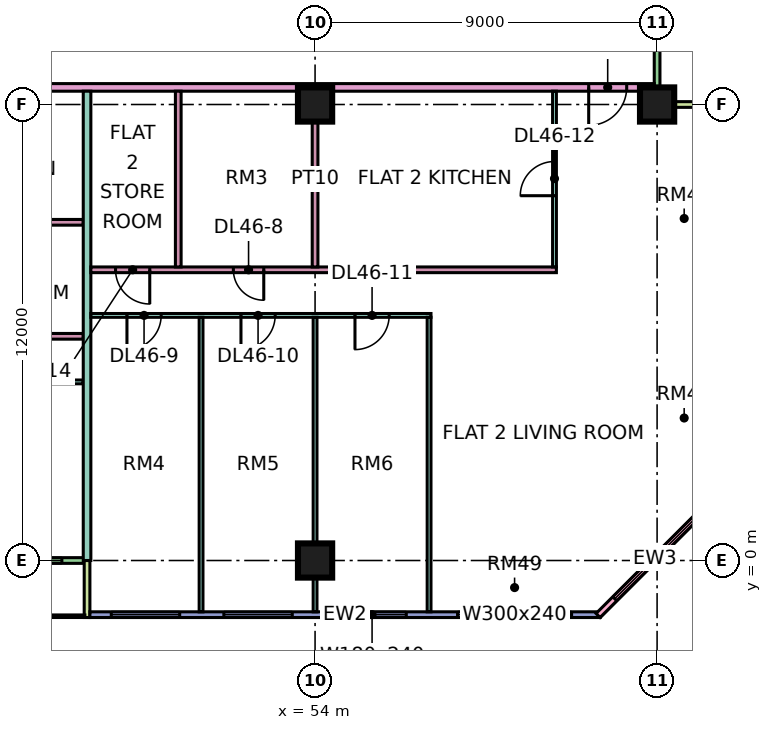
"""IFC4 building model, lengths in metres.
Left out: names, types, materials, properties, quantities, classifications, styles, units other than length and angle.
Written with IfcOpenShell. Run it as: python <this file> out.ifc"""

import sys

from ifc_helpers import new_model, si_unit, direction, frame, frame_2d, origin, origin_2d, place, context, subcontext, project, spatial, rectangle, extrude, element, fill, save


model = new_model("IFC4")
c1 = context("Model", 3, precision=1e-05, world=origin(), true_north=direction((0.0, 1.0)))
c2 = subcontext(c1, "Body", "Model", "MODEL_VIEW")
j1 = project(units=[si_unit("LENGTHUNIT", "METRE"), si_unit("PLANEANGLEUNIT", "RADIAN")], contexts=[c1])
p1 = place(None, origin())
s1 = spatial("IfcSite", under=j1, at=p1, CompositionType="ELEMENT")
p2 = place(p1, origin())
s2 = spatial("IfcBuilding", under=s1, at=p2, CompositionType="ELEMENT")
p3 = place(p2, frame((0.0, 0.0, 198.65)))
s3 = spatial("IfcBuildingStorey", under=s2, at=p3, CompositionType="ELEMENT", Elevation=198.65)
for number, where, z_axis, x_axis in (
    (1, (54.0, 0.0, 0.0), (0.0, 0.0, 1.0), (1.0, 0.0, 0.0)),
    (2, (54.0, 12.0, 0.0), (0.0, 0.0, 1.0), (1.0, 0.0, 0.0)),
    (3, (63.0, 12.0, 0.0), (0.0, 0.0, 1.0), (1.0, 0.0, 0.0)),
):
    element("IfcColumn", number, at=place(p3, frame(where, z_axis=z_axis, x_axis=x_axis)), inside=s3, PredefinedType="COLUMN", context=c2, shape_type="SweptSolid", body=[
        extrude(rectangle(XDim=0.9, YDim=0.9, at=origin_2d()), origin(), (0.0, 0.0, 1.0), 3.75),
    ])
p4 = place(p3, frame((36.075, 0.0, 0.0), z_axis=(0.0, 0.0, 1.0), x_axis=(1.0, 0.0, 0.0)))
e4 = element("IfcWall", 4, at=p4, inside=s3, PredefinedType="SOLIDWALL", context=c2, shape_type="SweptSolid", body=[
    extrude(rectangle(XDim=11.85, YDim=0.15, at=frame_2d((5.925, 0.0))), origin(), (0.0, 0.0, 1.0), 3.35),
])
p5 = place(p4, frame((1.1, 0.0, 0.0)))
e5 = element("IfcOpeningElement", 5, at=p5, cuts=e4, PredefinedType="OPENING", context=c2, shape_type="SweptSolid", body=[
    extrude(rectangle(XDim=1.2, YDim=2.4, at=frame_2d((0.6, 1.2))), frame((0.0, 0.085, 0.0), z_axis=(0.0, -1.0, 0.0), x_axis=(1.0, 0.0, 0.0)), (0.0, 0.0, 1.0), 0.17),
])
p6 = place(p4, frame((4.15, 0.0, 0.45)))
e6 = element("IfcOpeningElement", 6, at=p6, cuts=e4, PredefinedType="OPENING", context=c2, shape_type="SweptSolid", body=[
    extrude(rectangle(XDim=3.0, YDim=2.4, at=frame_2d((1.5, 1.2))), frame((0.0, 0.085, 0.0), z_axis=(0.0, -1.0, 0.0), x_axis=(1.0, 0.0, 0.0)), (0.0, 0.0, 1.0), 0.17),
])
p7 = place(p4, frame((10.062, 0.0, 0.45)))
e7 = element("IfcOpeningElement", 7, at=p7, cuts=e4, PredefinedType="OPENING", context=c2, shape_type="SweptSolid", body=[
    extrude(rectangle(XDim=1.2, YDim=2.4, at=frame_2d((0.6, 1.2))), frame((0.0, 0.085, 0.0), z_axis=(0.0, -1.0, 0.0), x_axis=(1.0, 0.0, 0.0)), (0.0, 0.0, 1.0), 0.17),
])
p8 = place(p3, frame((48.0, -1.5, 0.0), z_axis=(0.0, 0.0, 1.0), x_axis=(0.0, 1.0, 0.0)))
e8 = element("IfcWall", 8, at=p8, inside=s3, PredefinedType="SOLIDWALL", context=c2, shape_type="SweptSolid", body=[
    extrude(rectangle(XDim=1.5, YDim=0.15, at=frame_2d((0.75, 0.0))), origin(), (0.0, 0.0, 1.0), 3.35),
])
p9 = place(p3, frame((48.075, -1.425, 0.0), z_axis=(0.0, 0.0, 1.0), x_axis=(1.0, 0.0, 0.0)))
e9 = element("IfcWall", 9, at=p9, inside=s3, PredefinedType="SOLIDWALL", context=c2, shape_type="SweptSolid", body=[
    extrude(rectangle(XDim=13.425, YDim=0.15, at=frame_2d((6.712, 0.0))), origin(), (0.0, 0.0, 1.0), 3.35),
])
p10 = place(p9, frame((0.562, 0.0, 0.45)))
e10 = element("IfcOpeningElement", 10, at=p10, cuts=e9, PredefinedType="OPENING", context=c2, shape_type="SweptSolid", body=[
    extrude(rectangle(XDim=1.8, YDim=2.4, at=frame_2d((0.9, 1.2))), frame((0.0, 0.085, 0.0), z_axis=(0.0, -1.0, 0.0), x_axis=(1.0, 0.0, 0.0)), (0.0, 0.0, 1.0), 0.17),
])
p11 = place(p9, frame((3.525, 0.0, 0.45)))
e11 = element("IfcOpeningElement", 11, at=p11, cuts=e9, PredefinedType="OPENING", context=c2, shape_type="SweptSolid", body=[
    extrude(rectangle(XDim=1.8, YDim=2.4, at=frame_2d((0.9, 1.2))), frame((0.0, 0.085, 0.0), z_axis=(0.0, -1.0, 0.0), x_axis=(1.0, 0.0, 0.0)), (0.0, 0.0, 1.0), 0.17),
])
p12 = place(p9, frame((6.525, 0.0, 0.45)))
e12 = element("IfcOpeningElement", 12, at=p12, cuts=e9, PredefinedType="OPENING", context=c2, shape_type="SweptSolid", body=[
    extrude(rectangle(XDim=1.8, YDim=2.4, at=frame_2d((0.9, 1.2))), frame((0.0, 0.085, 0.0), z_axis=(0.0, -1.0, 0.0), x_axis=(1.0, 0.0, 0.0)), (0.0, 0.0, 1.0), 0.17),
])
p13 = place(p9, frame((9.675, 0.0, 0.45)))
e13 = element("IfcOpeningElement", 13, at=p13, cuts=e9, PredefinedType="OPENING", context=c2, shape_type="SweptSolid", body=[
    extrude(rectangle(XDim=3.0, YDim=2.4, at=frame_2d((1.5, 1.2))), frame((0.0, 0.085, 0.0), z_axis=(0.0, -1.0, 0.0), x_axis=(1.0, 0.0, 0.0)), (0.0, 0.0, 1.0), 0.17),
])
p14 = place(p3, frame((61.447, -1.447, 0.0), z_axis=(0.0, 0.0, 1.0), x_axis=(0.707106781187, 0.707106781187, 0.0)))
e14 = element("IfcWall", 14, at=p14, inside=s3, PredefinedType="SOLIDWALL", context=c2, shape_type="SweptSolid", body=[
    extrude(rectangle(XDim=4.243, YDim=0.15, at=frame_2d((2.121, 0.0))), origin(), (0.0, 0.0, 1.0), 3.35),
])
p15 = place(p14, frame((0.621, 0.0, 0.45)))
e15 = element("IfcOpeningElement", 15, at=p15, cuts=e14, PredefinedType="OPENING", context=c2, shape_type="SweptSolid", body=[
    extrude(rectangle(XDim=3.0, YDim=2.4, at=frame_2d((1.5, 1.2))), frame((0.0, 0.085, 0.0), z_axis=(0.0, -1.0, 0.0), x_axis=(1.0, 0.0, 0.0)), (0.0, 0.0, 1.0), 0.17),
])
p16 = place(p3, frame((63.0, 12.075, 0.0), z_axis=(0.0, 0.0, 1.0), x_axis=(0.0, 1.0, 0.0)))
e16 = element("IfcWall", 16, at=p16, inside=s3, PredefinedType="SOLIDWALL", context=c2, shape_type="SweptSolid", body=[
    extrude(rectangle(XDim=10.35, YDim=0.15, at=frame_2d((5.175, 0.0))), origin(), (0.0, 0.0, 1.0), 3.35),
])
p17 = place(p16, frame((4.125, 0.0, 0.45)))
e17 = element("IfcOpeningElement", 17, at=p17, cuts=e16, PredefinedType="OPENING", context=c2, shape_type="SweptSolid", body=[
    extrude(rectangle(XDim=1.8, YDim=2.4, at=frame_2d((0.9, 1.2))), frame((0.0, 0.085, 0.0), z_axis=(0.0, -1.0, 0.0), x_axis=(1.0, 0.0, 0.0)), (0.0, 0.0, 1.0), 0.17),
])
p18 = place(p16, frame((8.137, 0.0, 0.45)))
e18 = element("IfcOpeningElement", 18, at=p18, cuts=e16, PredefinedType="OPENING", context=c2, shape_type="SweptSolid", body=[
    extrude(rectangle(XDim=1.8, YDim=2.4, at=frame_2d((0.9, 1.2))), frame((0.0, 0.085, 0.0), z_axis=(0.0, -1.0, 0.0), x_axis=(1.0, 0.0, 0.0)), (0.0, 0.0, 1.0), 0.17),
])
p19 = place(p3, frame((64.5, 12.0, 0.0), z_axis=(0.0, 0.0, 1.0), x_axis=(-1.0, 0.0, 0.0)))
e19 = element("IfcWall", 19, at=p19, inside=s3, PredefinedType="SOLIDWALL", context=c2, shape_type="SweptSolid", body=[
    extrude(rectangle(XDim=1.5, YDim=0.15, at=frame_2d((0.75, 0.0))), origin(), (0.0, 0.0, 1.0), 3.35),
])
p20 = place(p3, frame((33.05, 4.7, 0.0), z_axis=(0.0, 0.0, 1.0), x_axis=(1.0, 0.0, 0.0)))
e20 = element("IfcWall", 20, at=p20, inside=s3, PredefinedType="PARTITIONING", context=c2, shape_type="SweptSolid", body=[
    extrude(rectangle(XDim=14.85, YDim=0.1, at=frame_2d((7.425, 0.0))), origin(), (0.0, 0.0, 1.0), 3.35),
])
p21 = place(p20, frame((1.0, 0.0, 0.0)))
e21 = element("IfcOpeningElement", 21, at=p21, cuts=e20, PredefinedType="OPENING", context=c2, shape_type="SweptSolid", body=[
    extrude(rectangle(XDim=0.9, YDim=2.1, at=frame_2d((0.45, 1.05))), frame((0.0, 0.06, 0.0), z_axis=(0.0, -1.0, 0.0), x_axis=(1.0, 0.0, 0.0)), (0.0, 0.0, 1.0), 0.12),
])
p22 = place(p20, frame((4.0, 0.0, 0.0)))
e22 = element("IfcOpeningElement", 22, at=p22, cuts=e20, PredefinedType="OPENING", context=c2, shape_type="SweptSolid", body=[
    extrude(rectangle(XDim=0.9, YDim=2.1, at=frame_2d((0.45, 1.05))), frame((0.0, 0.06, 0.0), z_axis=(0.0, -1.0, 0.0), x_axis=(1.0, 0.0, 0.0)), (0.0, 0.0, 1.0), 0.12),
])
p23 = place(p20, frame((10.0, 0.0, 0.0)))
e23 = element("IfcOpeningElement", 23, at=p23, cuts=e20, PredefinedType="OPENING", context=c2, shape_type="SweptSolid", body=[
    extrude(rectangle(XDim=0.9, YDim=2.1, at=frame_2d((0.45, 1.05))), frame((0.0, 0.06, 0.0), z_axis=(0.0, -1.0, 0.0), x_axis=(1.0, 0.0, 0.0)), (0.0, 0.0, 1.0), 0.12),
])
p24 = place(p3, frame((40.65, 12.45, 0.0), z_axis=(0.0, 0.0, 1.0), x_axis=(1.0, 0.0, 0.0)))
e24 = element("IfcWall", 24, at=p24, inside=s3, PredefinedType="PARTITIONING", context=c2, shape_type="SweptSolid", body=[
    extrude(rectangle(XDim=22.276, YDim=0.2, at=frame_2d((11.138, 0.0))), origin(), (0.0, 0.0, 1.0), 3.35),
])
p25 = place(p24, frame((20.55, 0.0, 0.0)))
e25 = element("IfcOpeningElement", 25, at=p25, cuts=e24, PredefinedType="OPENING", context=c2, shape_type="SweptSolid", body=[
    extrude(rectangle(XDim=1.0, YDim=2.1, at=frame_2d((0.5, 1.05))), frame((0.0, 0.11, 0.0), z_axis=(0.0, -1.0, 0.0), x_axis=(1.0, 0.0, 0.0)), (0.0, 0.0, 1.0), 0.22),
])
p26 = place(p24, frame((1.05, 0.0, 0.0)))
e26 = element("IfcOpeningElement", 26, at=p26, cuts=e24, PredefinedType="OPENING", context=c2, shape_type="SweptSolid", body=[
    extrude(rectangle(XDim=1.0, YDim=2.1, at=frame_2d((0.5, 1.05))), frame((0.0, 0.11, 0.0), z_axis=(0.0, -1.0, 0.0), x_axis=(1.0, 0.0, 0.0)), (0.0, 0.0, 1.0), 0.22),
])
p27 = place(p3, frame((43.725, 5.9, 0.0), z_axis=(0.0, 0.0, 1.0), x_axis=(1.0, 0.0, 0.0)))
e27 = element("IfcWall", 27, at=p27, inside=s3, PredefinedType="PARTITIONING", context=c2, shape_type="SweptSolid", body=[
    extrude(rectangle(XDim=4.175, YDim=0.15, at=frame_2d((2.087, 0.0))), origin(), (0.0, 0.0, 1.0), 3.35),
])
p28 = place(p27, frame((1.675, 0.0, 0.0)))
e28 = element("IfcOpeningElement", 28, at=p28, cuts=e27, PredefinedType="OPENING", context=c2, shape_type="SweptSolid", body=[
    extrude(rectangle(XDim=0.8, YDim=2.1, at=frame_2d((0.4, 1.05))), frame((0.0, 0.085, 0.0), z_axis=(0.0, -1.0, 0.0), x_axis=(1.0, 0.0, 0.0)), (0.0, 0.0, 1.0), 0.17),
])
p29 = place(p3, frame((43.725, 8.9, 0.0), z_axis=(0.0, 0.0, 1.0), x_axis=(1.0, 0.0, 0.0)))
e29 = element("IfcWall", 29, at=p29, inside=s3, PredefinedType="PARTITIONING", context=c2, shape_type="SweptSolid", body=[
    extrude(rectangle(XDim=4.175, YDim=0.15, at=frame_2d((2.087, 0.0))), origin(), (0.0, 0.0, 1.0), 3.35),
])
p30 = place(p3, frame((48.0, 0.0, 0.0), z_axis=(0.0, 0.0, 1.0), x_axis=(0.0, 1.0, 0.0)))
e30 = element("IfcWall", 30, at=p30, inside=s3, PredefinedType="PARTITIONING", context=c2, shape_type="SweptSolid", body=[
    extrude(rectangle(XDim=12.35, YDim=0.2, at=frame_2d((6.175, 0.0))), origin(), (0.0, 0.0, 1.0), 3.35),
])
p31 = place(p3, frame((48.1, 6.45, 0.0), z_axis=(0.0, 0.0, 1.0), x_axis=(1.0, 0.0, 0.0)))
e31 = element("IfcWall", 31, at=p31, inside=s3, PredefinedType="PARTITIONING", context=c2, shape_type="SweptSolid", body=[
    extrude(rectangle(XDim=8.95, YDim=0.1, at=frame_2d((4.475, 0.0))), origin(), (0.0, 0.0, 1.0), 3.35),
])
p32 = place(p31, frame((0.95, 0.0, 0.0)))
e32 = element("IfcOpeningElement", 32, at=p32, cuts=e31, PredefinedType="OPENING", context=c2, shape_type="SweptSolid", body=[
    extrude(rectangle(XDim=0.9, YDim=2.1, at=frame_2d((0.45, 1.05))), frame((0.0, 0.06, 0.0), z_axis=(0.0, -1.0, 0.0), x_axis=(1.0, 0.0, 0.0)), (0.0, 0.0, 1.0), 0.12),
])
p33 = place(p31, frame((3.95, 0.0, 0.0)))
e33 = element("IfcOpeningElement", 33, at=p33, cuts=e31, PredefinedType="OPENING", context=c2, shape_type="SweptSolid", body=[
    extrude(rectangle(XDim=0.9, YDim=2.1, at=frame_2d((0.45, 1.05))), frame((0.0, 0.06, 0.0), z_axis=(0.0, -1.0, 0.0), x_axis=(1.0, 0.0, 0.0)), (0.0, 0.0, 1.0), 0.12),
])
p34 = place(p31, frame((6.95, 0.0, 0.0)))
e34 = element("IfcOpeningElement", 34, at=p34, cuts=e31, PredefinedType="OPENING", context=c2, shape_type="SweptSolid", body=[
    extrude(rectangle(XDim=0.9, YDim=2.1, at=frame_2d((0.45, 1.05))), frame((0.0, 0.06, 0.0), z_axis=(0.0, -1.0, 0.0), x_axis=(1.0, 0.0, 0.0)), (0.0, 0.0, 1.0), 0.12),
])
p35 = place(p3, frame((48.1, 7.65, 0.0), z_axis=(0.0, 0.0, 1.0), x_axis=(1.0, 0.0, 0.0)))
e35 = element("IfcWall", 35, at=p35, inside=s3, PredefinedType="PARTITIONING", context=c2, shape_type="SweptSolid", body=[
    extrude(rectangle(XDim=12.25, YDim=0.15, at=frame_2d((6.125, 0.0))), origin(), (0.0, 0.0, 1.0), 3.35),
])
p36 = place(p35, frame((3.75, 0.0, 0.0)))
e36 = element("IfcOpeningElement", 36, at=p36, cuts=e35, PredefinedType="OPENING", context=c2, shape_type="SweptSolid", body=[
    extrude(rectangle(XDim=0.8, YDim=2.1, at=frame_2d((0.4, 1.05))), frame((0.0, 0.085, 0.0), z_axis=(0.0, -1.0, 0.0), x_axis=(1.0, 0.0, 0.0)), (0.0, 0.0, 1.0), 0.17),
])
p37 = place(p35, frame((0.65, 0.0, 0.0)))
e37 = element("IfcOpeningElement", 37, at=p37, cuts=e35, PredefinedType="OPENING", context=c2, shape_type="SweptSolid", body=[
    extrude(rectangle(XDim=0.9, YDim=2.1, at=frame_2d((0.45, 1.05))), frame((0.0, 0.085, 0.0), z_axis=(0.0, -1.0, 0.0), x_axis=(1.0, 0.0, 0.0)), (0.0, 0.0, 1.0), 0.17),
])
p38 = place(p3, frame((50.4, 7.725, 0.0), z_axis=(0.0, 0.0, 1.0), x_axis=(0.0, 1.0, 0.0)))
e38 = element("IfcWall", 38, at=p38, inside=s3, PredefinedType="PARTITIONING", context=c2, shape_type="SweptSolid", body=[
    extrude(rectangle(XDim=4.625, YDim=0.15, at=frame_2d((2.312, 0.0))), origin(), (0.0, 0.0, 1.0), 3.35),
])
for number, where, z_axis, x_axis in (
    (39, (51.0, -1.351, 0.0), (0.0, 0.0, 1.0), (0.0, 1.0, 0.0)),
    (40, (54.0, -1.351, 0.0), (0.0, 0.0, 1.0), (0.0, 1.0, 0.0)),
):
    element("IfcWall", number, at=place(p3, frame(where, z_axis=z_axis, x_axis=x_axis)), inside=s3, PredefinedType="PARTITIONING", context=c2, shape_type="SweptSolid", body=[
        extrude(rectangle(XDim=7.751, YDim=0.1, at=frame_2d((3.875, 0.0))), origin(), (0.0, 0.0, 1.0), 3.35),
    ])
p39 = place(p3, frame((54.0, 7.725, 0.0), z_axis=(0.0, 0.0, 1.0), x_axis=(0.0, 1.0, 0.0)))
e41 = element("IfcWall", 41, at=p39, inside=s3, PredefinedType="PARTITIONING", context=c2, shape_type="SweptSolid", body=[
    extrude(rectangle(XDim=4.625, YDim=0.15, at=frame_2d((2.312, 0.0))), origin(), (0.0, 0.0, 1.0), 3.35),
])
p40 = place(p3, frame((57.0, -1.35, 0.0), z_axis=(0.0, 0.0, 1.0), x_axis=(0.0, 1.0, 0.0)))
e42 = element("IfcWall", 42, at=p40, inside=s3, PredefinedType="PARTITIONING", context=c2, shape_type="SweptSolid", body=[
    extrude(rectangle(XDim=7.75, YDim=0.1, at=frame_2d((3.875, 0.0))), origin(), (0.0, 0.0, 1.0), 3.35),
])
p41 = place(p3, frame((60.3, 7.725, 0.0), z_axis=(0.0, 0.0, 1.0), x_axis=(0.0, 1.0, 0.0)))
e43 = element("IfcWall", 43, at=p41, inside=s3, PredefinedType="PARTITIONING", context=c2, shape_type="SweptSolid", body=[
    extrude(rectangle(XDim=4.625, YDim=0.1, at=frame_2d((2.312, 0.0))), origin(), (0.0, 0.0, 1.0), 3.35),
])
p42 = place(p41, frame((1.875, 0.0, 0.0)))
e44 = element("IfcOpeningElement", 44, at=p42, cuts=e43, PredefinedType="OPENING", context=c2, shape_type="SweptSolid", body=[
    extrude(rectangle(XDim=0.9, YDim=2.1, at=frame_2d((0.45, 1.05))), frame((0.0, 0.06, 0.0), z_axis=(0.0, -1.0, 0.0), x_axis=(1.0, 0.0, 0.0)), (0.0, 0.0, 1.0), 0.12),
])
p43 = place(p7, origin())
e45 = element("IfcWindow", 45, at=p43, inside=s3, PartitioningType="SINGLE_PANEL", PredefinedType="WINDOW", context=c2, shape_type="SweptSolid", body=[
    extrude(rectangle(XDim=1.2, YDim=2.4, at=frame_2d((0.6, 1.2))), frame((0.0, 0.03, 0.0), z_axis=(0.0, -1.0, 0.0), x_axis=(1.0, 0.0, 0.0)), (0.0, 0.0, 1.0), 0.06),
])
fill(e7, e45)
p44 = place(p10, origin())
e46 = element("IfcWindow", 46, at=p44, inside=s3, PartitioningType="SINGLE_PANEL", PredefinedType="WINDOW", context=c2, shape_type="SweptSolid", body=[
    extrude(rectangle(XDim=1.8, YDim=2.4, at=frame_2d((0.9, 1.2))), frame((0.0, 0.03, 0.0), z_axis=(0.0, -1.0, 0.0), x_axis=(1.0, 0.0, 0.0)), (0.0, 0.0, 1.0), 0.06),
])
fill(e10, e46)
p45 = place(p11, origin())
e47 = element("IfcWindow", 47, at=p45, inside=s3, PartitioningType="SINGLE_PANEL", PredefinedType="WINDOW", context=c2, shape_type="SweptSolid", body=[
    extrude(rectangle(XDim=1.8, YDim=2.4, at=frame_2d((0.9, 1.2))), frame((0.0, 0.03, 0.0), z_axis=(0.0, -1.0, 0.0), x_axis=(1.0, 0.0, 0.0)), (0.0, 0.0, 1.0), 0.06),
])
fill(e11, e47)
p46 = place(p12, origin())
e48 = element("IfcWindow", 48, at=p46, inside=s3, PartitioningType="SINGLE_PANEL", PredefinedType="WINDOW", context=c2, shape_type="SweptSolid", body=[
    extrude(rectangle(XDim=1.8, YDim=2.4, at=frame_2d((0.9, 1.2))), frame((0.0, 0.03, 0.0), z_axis=(0.0, -1.0, 0.0), x_axis=(1.0, 0.0, 0.0)), (0.0, 0.0, 1.0), 0.06),
])
fill(e12, e48)
p47 = place(p13, origin())
e49 = element("IfcWindow", 49, at=p47, inside=s3, PartitioningType="SINGLE_PANEL", PredefinedType="WINDOW", context=c2, shape_type="SweptSolid", body=[
    extrude(rectangle(XDim=3.0, YDim=2.4, at=frame_2d((1.5, 1.2))), frame((0.0, 0.03, 0.0), z_axis=(0.0, -1.0, 0.0), x_axis=(1.0, 0.0, 0.0)), (0.0, 0.0, 1.0), 0.06),
])
fill(e13, e49)
p48 = place(p15, origin())
e50 = element("IfcWindow", 50, at=p48, inside=s3, PartitioningType="SINGLE_PANEL", PredefinedType="WINDOW", context=c2, shape_type="SweptSolid", body=[
    extrude(rectangle(XDim=3.0, YDim=2.4, at=frame_2d((1.5, 1.2))), frame((0.0, 0.03, 0.0), z_axis=(0.0, -1.0, 0.0), x_axis=(1.0, 0.0, 0.0)), (0.0, 0.0, 1.0), 0.06),
])
fill(e15, e50)
p49 = place(p36, origin())
e51 = element("IfcDoor", 51, at=p49, inside=s3, OperationType="SINGLE_SWING_RIGHT", PredefinedType="DOOR", context=c2, shape_type="SweptSolid", body=[
    extrude(rectangle(XDim=0.8, YDim=2.1, at=frame_2d((0.4, 1.05))), frame((0.0, 0.025, 0.0), z_axis=(0.0, -1.0, 0.0), x_axis=(1.0, 0.0, 0.0)), (0.0, 0.0, 1.0), 0.05),
])
fill(e36, e51)
p50 = place(p32, frame((0.9, 0.0, 0.0), z_axis=(0.0, 0.0, 1.0), x_axis=(-1.0, 0.0, 0.0)))
e52 = element("IfcDoor", 52, at=p50, inside=s3, OperationType="SINGLE_SWING_LEFT", PredefinedType="DOOR", context=c2, shape_type="SweptSolid", body=[
    extrude(rectangle(XDim=0.9, YDim=2.1, at=frame_2d((0.45, 1.05))), frame((0.0, 0.025, 0.0), z_axis=(0.0, -1.0, 0.0), x_axis=(1.0, 0.0, 0.0)), (0.0, 0.0, 1.0), 0.05),
])
fill(e32, e52)
p51 = place(p33, frame((0.9, 0.0, 0.0), z_axis=(0.0, 0.0, 1.0), x_axis=(-1.0, 0.0, 0.0)))
e53 = element("IfcDoor", 53, at=p51, inside=s3, OperationType="SINGLE_SWING_LEFT", PredefinedType="DOOR", context=c2, shape_type="SweptSolid", body=[
    extrude(rectangle(XDim=0.9, YDim=2.1, at=frame_2d((0.45, 1.05))), frame((0.0, 0.025, 0.0), z_axis=(0.0, -1.0, 0.0), x_axis=(1.0, 0.0, 0.0)), (0.0, 0.0, 1.0), 0.05),
])
fill(e33, e53)
p52 = place(p34, frame((0.9, 0.0, 0.0), z_axis=(0.0, 0.0, 1.0), x_axis=(-1.0, 0.0, 0.0)))
e54 = element("IfcDoor", 54, at=p52, inside=s3, OperationType="SINGLE_SWING_LEFT", PredefinedType="DOOR", context=c2, shape_type="SweptSolid", body=[
    extrude(rectangle(XDim=0.9, YDim=2.1, at=frame_2d((0.45, 1.05))), frame((0.0, 0.025, 0.0), z_axis=(0.0, -1.0, 0.0), x_axis=(1.0, 0.0, 0.0)), (0.0, 0.0, 1.0), 0.05),
])
fill(e34, e54)
p53 = place(p42, origin())
e55 = element("IfcDoor", 55, at=p53, inside=s3, OperationType="SINGLE_SWING_LEFT", PredefinedType="DOOR", context=c2, shape_type="SweptSolid", body=[
    extrude(rectangle(XDim=0.9, YDim=2.1, at=frame_2d((0.45, 1.05))), frame((0.0, 0.025, 0.0), z_axis=(0.0, -1.0, 0.0), x_axis=(1.0, 0.0, 0.0)), (0.0, 0.0, 1.0), 0.05),
])
fill(e44, e55)
p54 = place(p25, frame((1.0, 0.0, 0.0), z_axis=(0.0, 0.0, 1.0), x_axis=(-1.0, 0.0, 0.0)))
e56 = element("IfcDoor", 56, at=p54, inside=s3, OperationType="SINGLE_SWING_LEFT", PredefinedType="DOOR", context=c2, shape_type="SweptSolid", body=[
    extrude(rectangle(XDim=1.0, YDim=2.1, at=frame_2d((0.5, 1.05))), frame((0.0, 0.025, 0.0), z_axis=(0.0, -1.0, 0.0), x_axis=(1.0, 0.0, 0.0)), (0.0, 0.0, 1.0), 0.05),
])
fill(e25, e56)
p55 = place(p37, origin())
e57 = element("IfcDoor", 57, at=p55, inside=s3, OperationType="SINGLE_SWING_RIGHT", PredefinedType="DOOR", context=c2, shape_type="SweptSolid", body=[
    extrude(rectangle(XDim=0.9, YDim=2.1, at=frame_2d((0.45, 1.05))), frame((0.0, 0.025, 0.0), z_axis=(0.0, -1.0, 0.0), x_axis=(1.0, 0.0, 0.0)), (0.0, 0.0, 1.0), 0.05),
])
fill(e37, e57)
save(model, sys.argv[1])
